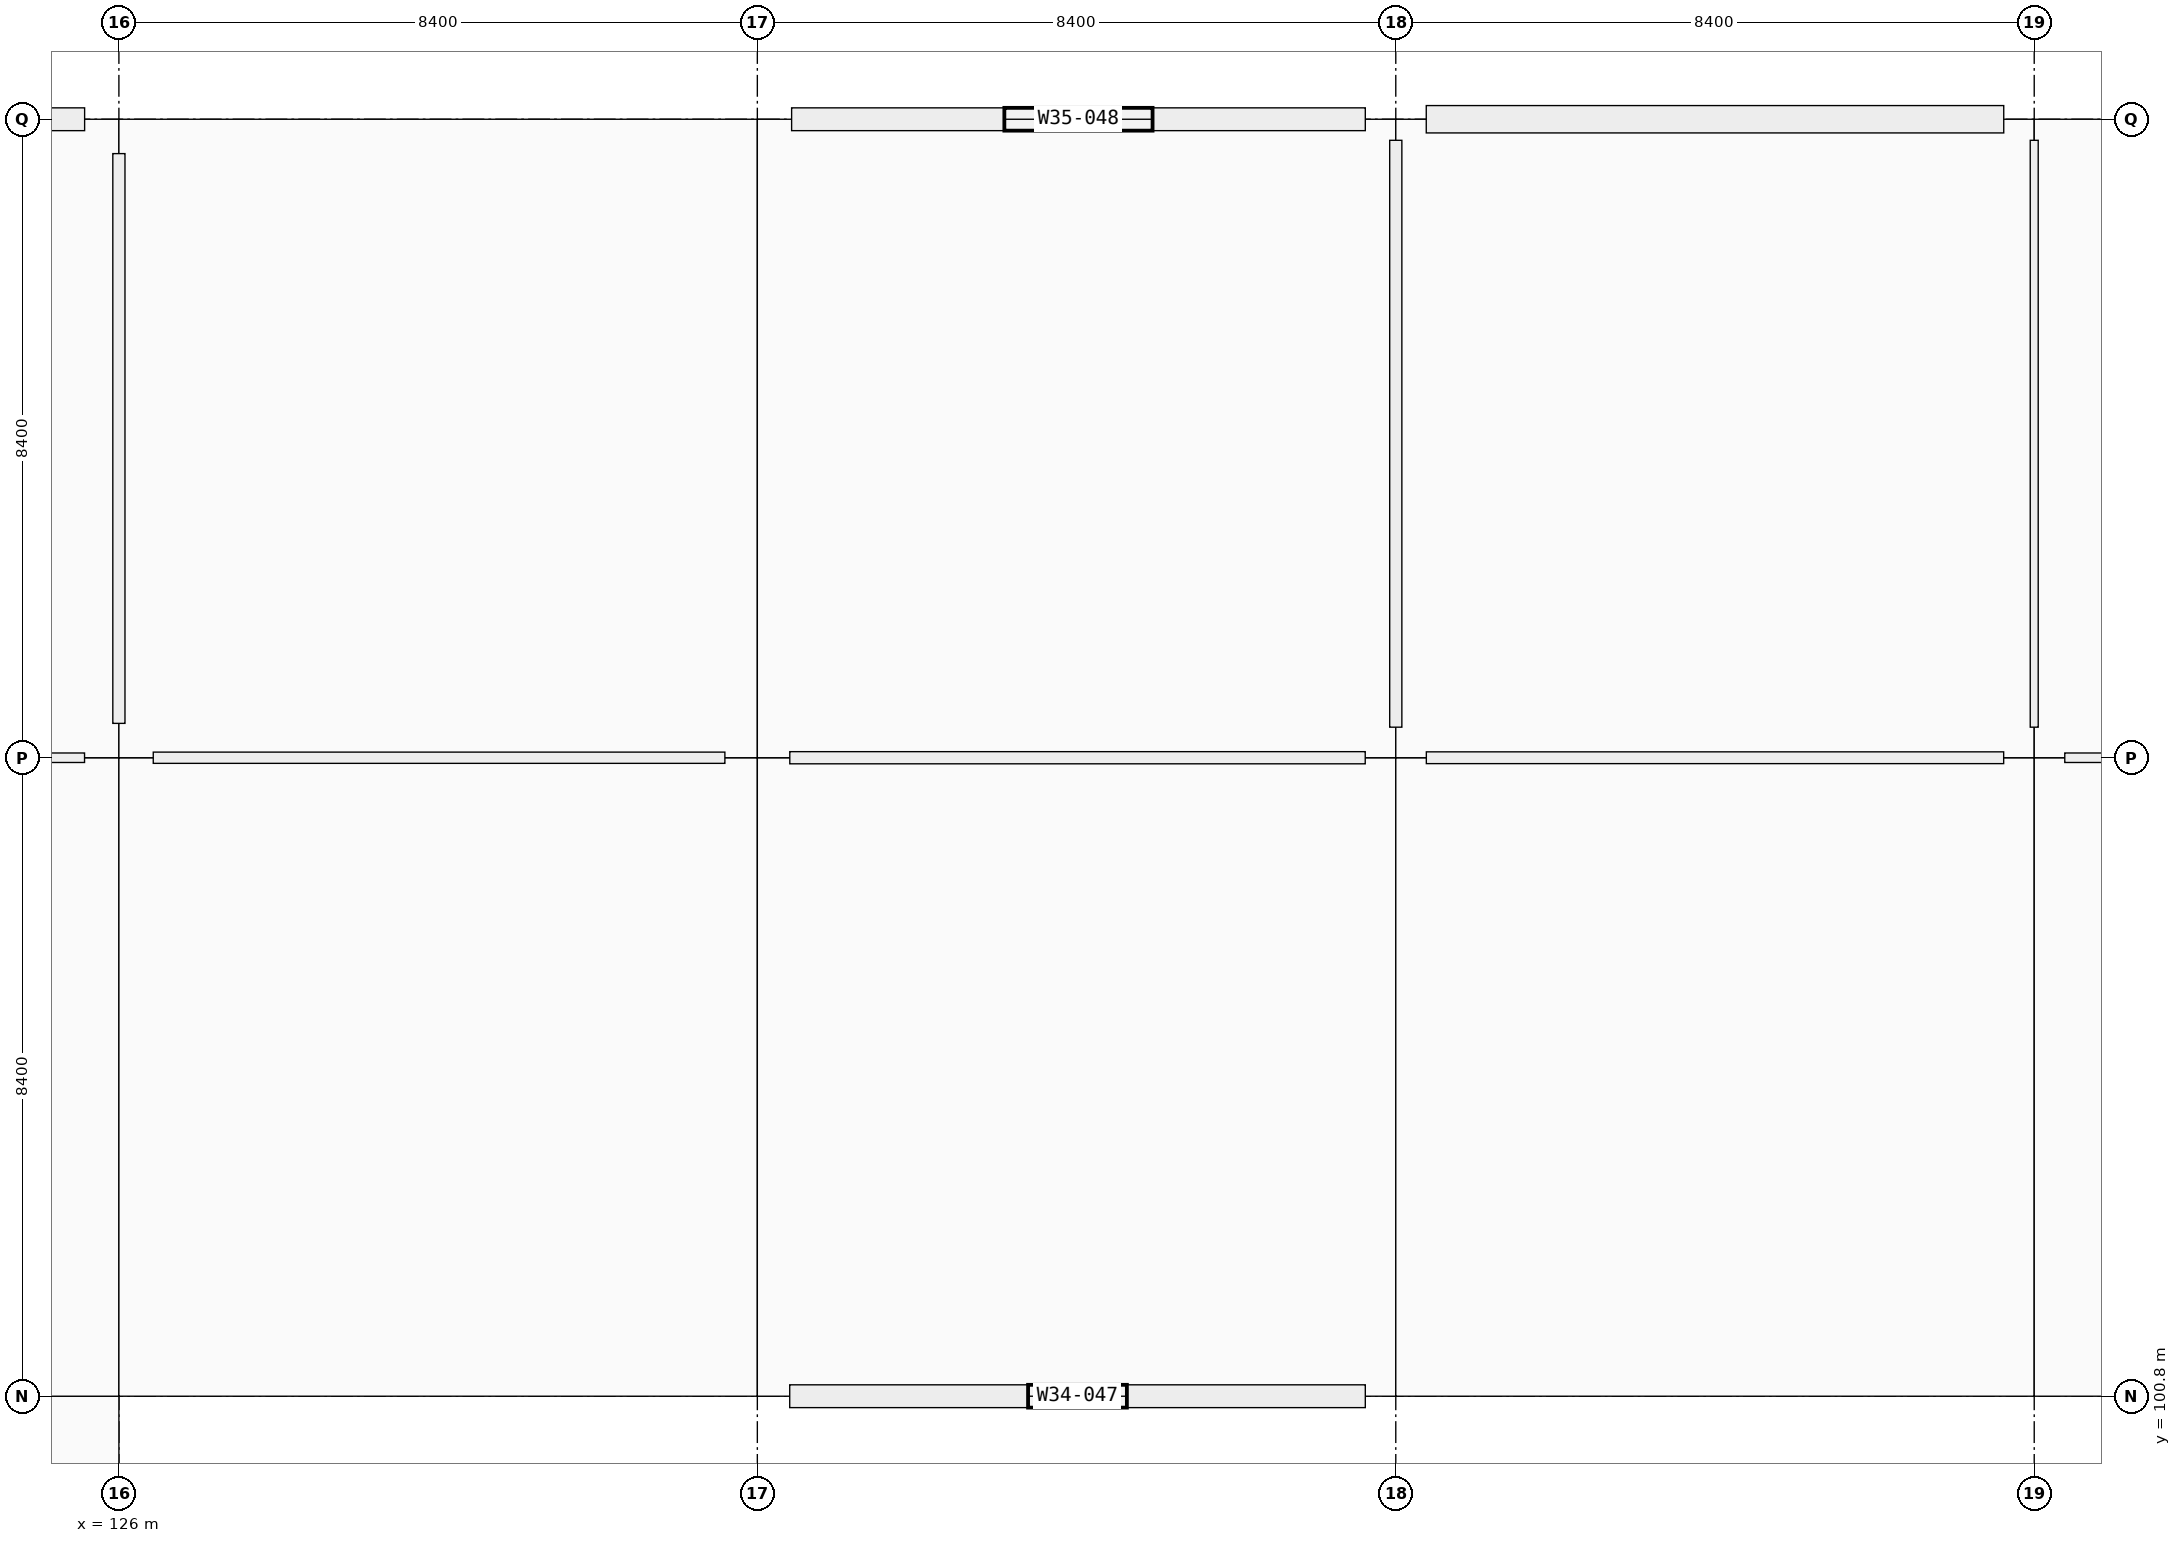
"""IFC4 building model, lengths in metres.
Left out: names, types, materials, properties, quantities, classifications, styles, units other than length and angle.
Written with IfcOpenShell. Run it as: python <this file> out.ifc"""

import sys

from ifc_helpers import new_model, si_unit, direction, frame, frame_2d, origin, origin_2d, place, context, subcontext, project, spatial, rectangle, extrude, element, fill, save


model = new_model("IFC4")
c1 = context("Model", 3, precision=1e-05, world=origin(), true_north=direction((0.0, 1.0)))
c2 = subcontext(c1, "Body", "Model", "MODEL_VIEW")
j1 = project(units=[si_unit("LENGTHUNIT", "METRE"), si_unit("PLANEANGLEUNIT", "RADIAN")], contexts=[c1])
p1 = place(None, origin())
s1 = spatial("IfcSite", under=j1, at=p1, CompositionType="ELEMENT")
p2 = place(p1, origin())
s2 = spatial("IfcBuilding", under=s1, at=p2, CompositionType="ELEMENT")
p3 = place(p2, origin())
s3 = spatial("IfcBuildingStorey", under=s2, at=p3, CompositionType="ELEMENT", Elevation=0.0)
for number, where, z_axis, x_axis in (
    (1, (126.0, 100.8, 0.0), (0.0, 0.0, 1.0), (1.0, 0.0, 0.0)),
    (2, (126.0, 109.2, 0.0), (0.0, 0.0, 1.0), (1.0, 0.0, 0.0)),
    (3, (126.0, 117.6, 0.0), (0.0, 0.0, 1.0), (1.0, 0.0, 0.0)),
):
    element("IfcColumn", number, at=place(p3, frame(where, z_axis=z_axis, x_axis=x_axis)), inside=s3, PredefinedType="COLUMN", context=c2, shape_type="SweptSolid", body=[
        extrude(rectangle(XDim=0.9, YDim=0.9, at=origin_2d()), origin(), (0.0, 0.0, 1.0), 5.76),
    ])
for number, where, z_axis, x_axis in (
    (4, (134.4, 100.8, 0.0), (0.0, 0.0, 1.0), (1.0, 0.0, 0.0)),
    (5, (134.4, 109.2, 0.0), (0.0, 0.0, 1.0), (1.0, 0.0, 0.0)),
):
    element("IfcColumn", number, at=place(p3, frame(where, z_axis=z_axis, x_axis=x_axis)), inside=s3, PredefinedType="COLUMN", context=c2, shape_type="SweptSolid", body=[
        extrude(rectangle(XDim=0.85, YDim=0.85, at=origin_2d()), origin(), (0.0, 0.0, 1.0), 5.76),
    ])
p4 = place(p3, frame((134.4, 117.6, 0.0), z_axis=(0.0, 0.0, 1.0), x_axis=(1.0, 0.0, 0.0)))
e6 = element("IfcColumn", 6, at=p4, inside=s3, PredefinedType="COLUMN", context=c2, shape_type="SweptSolid", body=[
    extrude(rectangle(XDim=0.9, YDim=0.6, at=origin_2d()), origin(), (0.0, 0.0, 1.0), 5.76),
])
for number, where, z_axis, x_axis in (
    (7, (142.8, 100.8, 0.0), (0.0, 0.0, 1.0), (1.0, 0.0, 0.0)),
    (8, (142.8, 109.2, 0.0), (0.0, 0.0, 1.0), (1.0, 0.0, 0.0)),
):
    element("IfcColumn", number, at=place(p3, frame(where, z_axis=z_axis, x_axis=x_axis)), inside=s3, PredefinedType="COLUMN", context=c2, shape_type="SweptSolid", body=[
        extrude(rectangle(XDim=0.8, YDim=0.8, at=origin_2d()), origin(), (0.0, 0.0, 1.0), 5.76),
    ])
p5 = place(p3, frame((142.8, 117.6, 0.0), z_axis=(0.0, 0.0, 1.0), x_axis=(1.0, 0.0, 0.0)))
e9 = element("IfcColumn", 9, at=p5, inside=s3, PredefinedType="COLUMN", context=c2, shape_type="SweptSolid", body=[
    extrude(rectangle(XDim=0.8, YDim=0.55, at=origin_2d()), origin(), (0.0, 0.0, 1.0), 5.76),
])
for number, where, z_axis, x_axis in (
    (10, (151.2, 100.8, 0.0), (0.0, 0.0, 1.0), (1.0, 0.0, 0.0)),
    (11, (151.2, 109.2, 0.0), (0.0, 0.0, 1.0), (1.0, 0.0, 0.0)),
):
    element("IfcColumn", number, at=place(p3, frame(where, z_axis=z_axis, x_axis=x_axis)), inside=s3, PredefinedType="COLUMN", context=c2, shape_type="SweptSolid", body=[
        extrude(rectangle(XDim=0.8, YDim=0.8, at=origin_2d()), origin(), (0.0, 0.0, 1.0), 5.76),
    ])
p6 = place(p3, frame((151.2, 117.6, 0.0), z_axis=(0.0, 0.0, 1.0), x_axis=(1.0, 0.0, 0.0)))
e12 = element("IfcColumn", 12, at=p6, inside=s3, PredefinedType="COLUMN", context=c2, shape_type="SweptSolid", body=[
    extrude(rectangle(XDim=0.8, YDim=0.55, at=origin_2d()), origin(), (0.0, 0.0, 1.0), 5.76),
])
p7 = place(p3, frame((118.051, 117.6, 0.0), z_axis=(0.0, 0.0, 1.0), x_axis=(1.0, 0.0, 0.0)))
e13 = element("IfcWall", 13, at=p7, inside=s3, PredefinedType="SOLIDWALL", context=c2, shape_type="SweptSolid", body=[
    extrude(rectangle(XDim=7.498, YDim=0.3, at=frame_2d((3.749, 0.0))), origin(), (0.0, 0.0, 1.0), 4.7),
])
p8 = place(p7, frame((2.674, 0.0, 0.9)))
e14 = element("IfcOpeningElement", 14, at=p8, cuts=e13, PredefinedType="OPENING", context=c2, shape_type="SweptSolid", body=[
    extrude(rectangle(XDim=2.15, YDim=1.95, at=frame_2d((1.075, 0.975))), frame((0.0, 0.15, 0.0), z_axis=(0.0, -1.0, 0.0), x_axis=(1.0, 0.0, 0.0)), (0.0, 0.0, 1.0), 0.3),
])
p9 = place(p3, frame((142.399, 100.8, 0.0), z_axis=(0.0, 0.0, 1.0), x_axis=(-1.0, 0.0, 0.0)))
e15 = element("IfcWall", 15, at=p9, inside=s3, PredefinedType="SOLIDWALL", context=c2, shape_type="SweptSolid", body=[
    extrude(rectangle(XDim=7.573, YDim=0.3, at=frame_2d((3.787, 0.0))), origin(), (0.0, 0.0, 1.0), 4.7),
])
p10 = place(p9, frame((3.137, 0.0, 0.9)))
e16 = element("IfcOpeningElement", 16, at=p10, cuts=e15, PredefinedType="OPENING", context=c2, shape_type="SweptSolid", body=[
    extrude(rectangle(XDim=1.3, YDim=1.95, at=frame_2d((0.65, 0.975))), frame((0.0, 0.15, 0.0), z_axis=(0.0, -1.0, 0.0), x_axis=(1.0, 0.0, 0.0)), (0.0, 0.0, 1.0), 0.3),
])
p11 = place(p3, frame((134.851, 117.6, 0.0), z_axis=(0.0, 0.0, 1.0), x_axis=(1.0, 0.0, 0.0)))
e17 = element("IfcWall", 17, at=p11, inside=s3, PredefinedType="SOLIDWALL", context=c2, shape_type="SweptSolid", body=[
    extrude(rectangle(XDim=7.548, YDim=0.3, at=frame_2d((3.774, 0.0))), origin(), (0.0, 0.0, 1.0), 4.7),
])
p12 = place(p11, frame((2.799, 0.0, 0.9)))
e18 = element("IfcOpeningElement", 18, at=p12, cuts=e17, PredefinedType="OPENING", context=c2, shape_type="SweptSolid", body=[
    extrude(rectangle(XDim=1.95, YDim=1.6, at=frame_2d((0.975, 0.8))), frame((0.0, 0.15, 0.0), z_axis=(0.0, -1.0, 0.0), x_axis=(1.0, 0.0, 0.0)), (0.0, 0.0, 1.0), 0.3),
])
p13 = place(p3, frame((143.201, 117.6, 0.0), z_axis=(0.0, 0.0, 1.0), x_axis=(1.0, 0.0, 0.0)))
e19 = element("IfcWall", 19, at=p13, inside=s3, PredefinedType="SOLIDWALL", context=c2, shape_type="SweptSolid", body=[
    extrude(rectangle(XDim=7.598, YDim=0.36, at=frame_2d((3.799, 0.0))), origin(), (0.0, 0.0, 1.0), 4.7),
])
p14 = place(p13, frame((2.799, 0.0, 0.0)))
e20 = element("IfcOpeningElement", 20, at=p14, cuts=e19, PredefinedType="OPENING", context=c2, shape_type="SweptSolid", body=[
    extrude(rectangle(XDim=2.0, YDim=2.25, at=frame_2d((1.0, 1.125))), frame((0.0, 0.18, 0.0), z_axis=(0.0, -1.0, 0.0), x_axis=(1.0, 0.0, 0.0)), (0.0, 0.0, 1.0), 0.36),
])
p15 = place(p3, frame((118.052, 109.2, 0.0), z_axis=(0.0, 0.0, 1.0), x_axis=(1.0, 0.0, 0.0)))
e21 = element("IfcWall", 21, at=p15, inside=s3, PredefinedType="PARTITIONING", context=c2, shape_type="SweptSolid", body=[
    extrude(rectangle(XDim=7.496, YDim=0.125, at=frame_2d((3.748, 0.0))), origin(), (0.0, 0.0, 1.0), 3.66),
])
p16 = place(p15, frame((3.288, 0.0, 0.0)))
e22 = element("IfcOpeningElement", 22, at=p16, cuts=e21, PredefinedType="OPENING", context=c2, shape_type="SweptSolid", body=[
    extrude(rectangle(XDim=0.92, YDim=2.15, at=frame_2d((0.46, 1.075))), frame((0.0, 0.062, 0.0), z_axis=(0.0, -1.0, 0.0), x_axis=(1.0, 0.0, 0.0)), (0.0, 0.0, 1.0), 0.125),
])
p17 = place(p3, frame((126.452, 109.2, 0.0), z_axis=(0.0, 0.0, 1.0), x_axis=(1.0, 0.0, 0.0)))
e23 = element("IfcWall", 23, at=p17, inside=s3, PredefinedType="PARTITIONING", context=c2, shape_type="SweptSolid", body=[
    extrude(rectangle(XDim=7.521, YDim=0.148, at=frame_2d((3.76, 0.0))), origin(), (0.0, 0.0, 1.0), 3.66),
])
p18 = place(p17, frame((3.236, 0.0, 0.0)))
e24 = element("IfcOpeningElement", 24, at=p18, cuts=e23, PredefinedType="OPENING", context=c2, shape_type="SweptSolid", body=[
    extrude(rectangle(XDim=1.05, YDim=2.15, at=frame_2d((0.525, 1.075))), frame((0.0, 0.074, 0.0), z_axis=(0.0, -1.0, 0.0), x_axis=(1.0, 0.0, 0.0)), (0.0, 0.0, 1.0), 0.148),
])
p19 = place(p3, frame((134.827, 109.2, 0.0), z_axis=(0.0, 0.0, 1.0), x_axis=(1.0, 0.0, 0.0)))
e25 = element("IfcWall", 25, at=p19, inside=s3, PredefinedType="PARTITIONING", context=c2, shape_type="SweptSolid", body=[
    extrude(rectangle(XDim=7.571, YDim=0.16, at=frame_2d((3.786, 0.0))), origin(), (0.0, 0.0, 1.0), 3.66),
])
p20 = place(p19, frame((3.285, 0.0, 0.0)))
e26 = element("IfcOpeningElement", 26, at=p20, cuts=e25, PredefinedType="OPENING", context=c2, shape_type="SweptSolid", body=[
    extrude(rectangle(XDim=1.0, YDim=2.15, at=frame_2d((0.5, 1.075))), frame((0.0, 0.08, 0.0), z_axis=(0.0, -1.0, 0.0), x_axis=(1.0, 0.0, 0.0)), (0.0, 0.0, 1.0), 0.16),
])
p21 = place(p3, frame((143.202, 109.2, 0.0), z_axis=(0.0, 0.0, 1.0), x_axis=(1.0, 0.0, 0.0)))
e27 = element("IfcWall", 27, at=p21, inside=s3, PredefinedType="PARTITIONING", context=c2, shape_type="SweptSolid", body=[
    extrude(rectangle(XDim=7.596, YDim=0.155, at=frame_2d((3.798, 0.0))), origin(), (0.0, 0.0, 1.0), 3.66),
])
p22 = place(p21, frame((3.333, 0.0, 0.0)))
e28 = element("IfcOpeningElement", 28, at=p22, cuts=e27, PredefinedType="OPENING", context=c2, shape_type="SweptSolid", body=[
    extrude(rectangle(XDim=0.93, YDim=2.12, at=frame_2d((0.465, 1.06))), frame((0.0, 0.078, 0.0), z_axis=(0.0, -1.0, 0.0), x_axis=(1.0, 0.0, 0.0)), (0.0, 0.0, 1.0), 0.155),
])
p23 = place(p3, frame((151.602, 109.2, 0.0), z_axis=(0.0, 0.0, 1.0), x_axis=(1.0, 0.0, 0.0)))
e29 = element("IfcWall", 29, at=p23, inside=s3, PredefinedType="PARTITIONING", context=c2, shape_type="SweptSolid", body=[
    extrude(rectangle(XDim=7.621, YDim=0.125, at=frame_2d((3.811, 0.0))), origin(), (0.0, 0.0, 1.0), 3.66),
])
p24 = place(p23, frame((3.271, 0.0, 0.0)))
e30 = element("IfcOpeningElement", 30, at=p24, cuts=e29, PredefinedType="OPENING", context=c2, shape_type="SweptSolid", body=[
    extrude(rectangle(XDim=1.08, YDim=2.25, at=frame_2d((0.54, 1.125))), frame((0.0, 0.062, 0.0), z_axis=(0.0, -1.0, 0.0), x_axis=(1.0, 0.0, 0.0)), (0.0, 0.0, 1.0), 0.125),
])
p25 = place(p3, frame((126.0, 109.652, 0.0), z_axis=(0.0, 0.0, 1.0), x_axis=(0.0, 1.0, 0.0)))
e31 = element("IfcWall", 31, at=p25, inside=s3, PredefinedType="PARTITIONING", context=c2, shape_type="SweptSolid", body=[
    extrude(rectangle(XDim=7.496, YDim=0.16, at=frame_2d((3.748, 0.0))), origin(), (0.0, 0.0, 1.0), 3.66),
])
p26 = place(p25, frame((3.173, 0.0, 0.0)))
e32 = element("IfcOpeningElement", 32, at=p26, cuts=e31, PredefinedType="OPENING", context=c2, shape_type="SweptSolid", body=[
    extrude(rectangle(XDim=1.15, YDim=2.2, at=frame_2d((0.575, 1.1))), frame((0.0, 0.08, 0.0), z_axis=(0.0, -1.0, 0.0), x_axis=(1.0, 0.0, 0.0)), (0.0, 0.0, 1.0), 0.16),
])
p27 = place(p3, frame((142.8, 109.602, 0.0), z_axis=(0.0, 0.0, 1.0), x_axis=(0.0, 1.0, 0.0)))
e33 = element("IfcWall", 33, at=p27, inside=s3, PredefinedType="PARTITIONING", context=c2, shape_type="SweptSolid", body=[
    extrude(rectangle(XDim=7.721, YDim=0.16, at=frame_2d((3.86, 0.0))), origin(), (0.0, 0.0, 1.0), 3.66),
])
p28 = place(p27, frame((3.311, 0.0, 0.0)))
e34 = element("IfcOpeningElement", 34, at=p28, cuts=e33, PredefinedType="OPENING", context=c2, shape_type="SweptSolid", body=[
    extrude(rectangle(XDim=1.1, YDim=2.15, at=frame_2d((0.55, 1.075))), frame((0.0, 0.08, 0.0), z_axis=(0.0, -1.0, 0.0), x_axis=(1.0, 0.0, 0.0)), (0.0, 0.0, 1.0), 0.16),
])
p29 = place(p3, frame((151.2, 109.602, 0.0), z_axis=(0.0, 0.0, 1.0), x_axis=(0.0, 1.0, 0.0)))
e35 = element("IfcWall", 35, at=p29, inside=s3, PredefinedType="PARTITIONING", context=c2, shape_type="SweptSolid", body=[
    extrude(rectangle(XDim=7.721, YDim=0.105, at=frame_2d((3.86, 0.0))), origin(), (0.0, 0.0, 1.0), 3.66),
])
p30 = place(p29, frame((3.401, 0.0, 0.0)))
e36 = element("IfcOpeningElement", 36, at=p30, cuts=e35, PredefinedType="OPENING", context=c2, shape_type="SweptSolid", body=[
    extrude(rectangle(XDim=0.92, YDim=2.15, at=frame_2d((0.46, 1.075))), frame((0.0, 0.052, 0.0), z_axis=(0.0, -1.0, 0.0), x_axis=(1.0, 0.0, 0.0)), (0.0, 0.0, 1.0), 0.105),
])
p31 = place(p10, origin())
e37 = element("IfcWindow", 37, at=p31, inside=s3, PartitioningType="SINGLE_PANEL", PredefinedType="WINDOW", context=c2, shape_type="SweptSolid", body=[
    extrude(rectangle(XDim=1.3, YDim=1.95, at=frame_2d((0.65, 0.975))), frame((0.0, 0.03, 0.0), z_axis=(0.0, -1.0, 0.0), x_axis=(1.0, 0.0, 0.0)), (0.0, 0.0, 1.0), 0.06),
])
fill(e16, e37)
p32 = place(p12, origin())
e38 = element("IfcWindow", 38, at=p32, inside=s3, PartitioningType="SINGLE_PANEL", PredefinedType="WINDOW", context=c2, shape_type="SweptSolid", body=[
    extrude(rectangle(XDim=1.95, YDim=1.6, at=frame_2d((0.975, 0.8))), frame((0.0, 0.03, 0.0), z_axis=(0.0, -1.0, 0.0), x_axis=(1.0, 0.0, 0.0)), (0.0, 0.0, 1.0), 0.06),
])
fill(e18, e38)
p33 = place(p14, origin())
e39 = element("IfcDoor", 39, at=p33, inside=s3, OperationType="DOUBLE_DOOR_SINGLE_SWING", PredefinedType="DOOR", context=c2, shape_type="SweptSolid", body=[
    extrude(rectangle(XDim=2.0, YDim=2.25, at=frame_2d((1.0, 1.125))), frame((0.0, 0.025, 0.0), z_axis=(0.0, -1.0, 0.0), x_axis=(1.0, 0.0, 0.0)), (0.0, 0.0, 1.0), 0.05),
])
fill(e20, e39)
p34 = place(p18, origin())
e40 = element("IfcDoor", 40, at=p34, inside=s3, OperationType="SINGLE_SWING_RIGHT", PredefinedType="DOOR", context=c2, shape_type="SweptSolid", body=[
    extrude(rectangle(XDim=1.05, YDim=2.15, at=frame_2d((0.525, 1.075))), frame((0.0, 0.025, 0.0), z_axis=(0.0, -1.0, 0.0), x_axis=(1.0, 0.0, 0.0)), (0.0, 0.0, 1.0), 0.05),
])
fill(e24, e40)
p35 = place(p20, origin())
e41 = element("IfcDoor", 41, at=p35, inside=s3, OperationType="SINGLE_SWING_RIGHT", PredefinedType="DOOR", context=c2, shape_type="SweptSolid", body=[
    extrude(rectangle(XDim=1.0, YDim=2.15, at=frame_2d((0.5, 1.075))), frame((0.0, 0.025, 0.0), z_axis=(0.0, -1.0, 0.0), x_axis=(1.0, 0.0, 0.0)), (0.0, 0.0, 1.0), 0.05),
])
fill(e26, e41)
p36 = place(p22, origin())
e42 = element("IfcDoor", 42, at=p36, inside=s3, OperationType="SINGLE_SWING_LEFT", PredefinedType="DOOR", context=c2, shape_type="SweptSolid", body=[
    extrude(rectangle(XDim=0.93, YDim=2.12, at=frame_2d((0.465, 1.06))), frame((0.0, 0.025, 0.0), z_axis=(0.0, -1.0, 0.0), x_axis=(1.0, 0.0, 0.0)), (0.0, 0.0, 1.0), 0.05),
])
fill(e28, e42)
p37 = place(p26, origin())
e43 = element("IfcDoor", 43, at=p37, inside=s3, OperationType="SINGLE_SWING_RIGHT", PredefinedType="DOOR", context=c2, shape_type="SweptSolid", body=[
    extrude(rectangle(XDim=1.15, YDim=2.2, at=frame_2d((0.575, 1.1))), frame((0.0, 0.025, 0.0), z_axis=(0.0, -1.0, 0.0), x_axis=(1.0, 0.0, 0.0)), (0.0, 0.0, 1.0), 0.05),
])
fill(e32, e43)
p38 = place(p28, origin())
e44 = element("IfcDoor", 44, at=p38, inside=s3, OperationType="SINGLE_SWING_RIGHT", PredefinedType="DOOR", context=c2, shape_type="SweptSolid", body=[
    extrude(rectangle(XDim=1.1, YDim=2.15, at=frame_2d((0.55, 1.075))), frame((0.0, 0.025, 0.0), z_axis=(0.0, -1.0, 0.0), x_axis=(1.0, 0.0, 0.0)), (0.0, 0.0, 1.0), 0.05),
])
fill(e34, e44)
p39 = place(p30, origin())
e45 = element("IfcDoor", 45, at=p39, inside=s3, OperationType="SINGLE_SWING_RIGHT", PredefinedType="DOOR", context=c2, shape_type="SweptSolid", body=[
    extrude(rectangle(XDim=0.92, YDim=2.15, at=frame_2d((0.46, 1.075))), frame((0.0, 0.025, 0.0), z_axis=(0.0, -1.0, 0.0), x_axis=(1.0, 0.0, 0.0)), (0.0, 0.0, 1.0), 0.05),
])
fill(e36, e45)
save(model, sys.argv[1])
